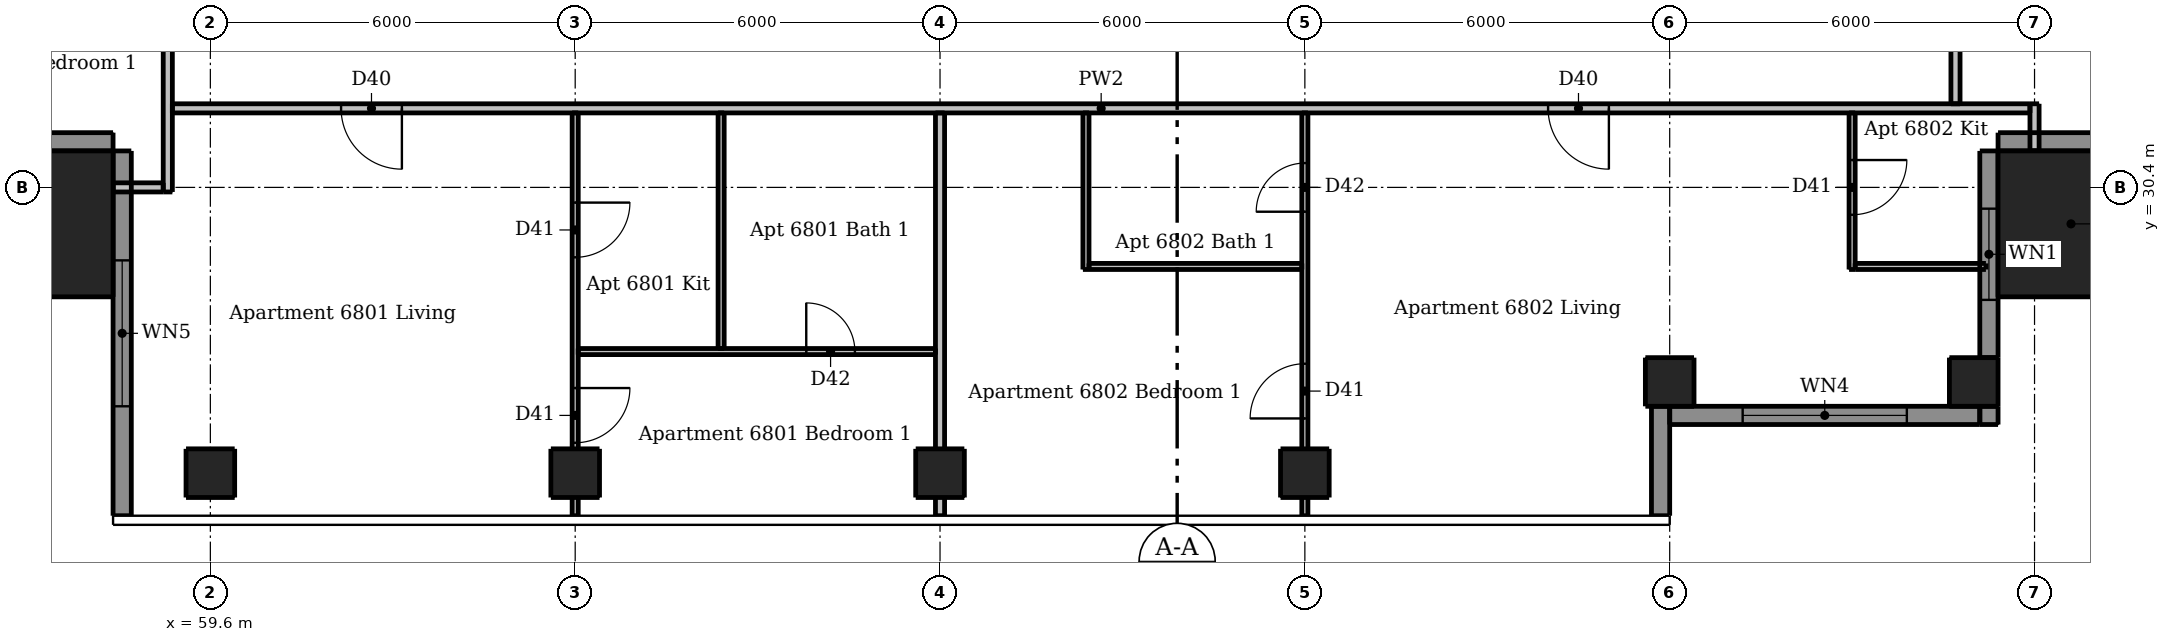
"""IFC4 building model, lengths in metres.
Left out: names, types, materials, properties, quantities, classifications, styles, units other than length and angle.
Written with IfcOpenShell. Run it as: python <this file> out.ifc"""

import sys

from ifc_helpers import new_model, si_unit, direction, frame, frame_2d, origin, origin_2d, place, context, subcontext, project, spatial, rectangle, extrude, element, fill, save


model = new_model("IFC4")
c1 = context("Model", 3, precision=1e-05, world=origin(), true_north=direction((0.0, 1.0)))
c2 = subcontext(c1, "Body", "Model", "MODEL_VIEW")
j1 = project(units=[si_unit("LENGTHUNIT", "METRE"), si_unit("PLANEANGLEUNIT", "RADIAN")], contexts=[c1])
p1 = place(None, origin())
s1 = spatial("IfcSite", under=j1, at=p1, CompositionType="ELEMENT")
p2 = place(p1, origin())
s2 = spatial("IfcBuilding", under=s1, at=p2, CompositionType="ELEMENT")
p3 = place(p2, frame((0.0, 0.0, 255.4)))
s3 = spatial("IfcBuildingStorey", under=s2, at=p3, CompositionType="ELEMENT", Elevation=255.4)
for number, where, z_axis, x_axis in (
    (1, (59.6, 25.7, 0.0), (0.0, 0.0, 1.0), (1.0, 0.0, 0.0)),
    (2, (65.6, 25.7, 0.0), (0.0, 0.0, 1.0), (1.0, 0.0, 0.0)),
    (3, (71.6, 25.7, 0.0), (0.0, 0.0, 1.0), (1.0, 0.0, 0.0)),
    (4, (77.6, 25.7, 0.0), (0.0, 0.0, 1.0), (1.0, 0.0, 0.0)),
    (5, (83.6, 27.2, 0.0), (0.0, 0.0, 1.0), (1.0, 0.0, 0.0)),
    (6, (88.6, 27.2, 0.0), (0.0, 0.0, 1.0), (1.0, 0.0, 0.0)),
):
    element("IfcColumn", number, at=place(p3, frame(where, z_axis=z_axis, x_axis=x_axis)), inside=s3, PredefinedType="COLUMN", context=c2, shape_type="SweptSolid", body=[
        extrude(rectangle(XDim=0.8, YDim=0.8, at=origin_2d()), origin(), (0.0, 0.0, 1.0), 3.05),
    ])
for number, where, z_axis, x_axis in (
    (7, (56.8, 29.8, 0.0), (0.0, 0.0, 1.0), (1.0, 0.0, 0.0)),
    (8, (90.2, 29.8, 0.0), (0.0, 0.0, 1.0), (1.0, 0.0, 0.0)),
):
    element("IfcColumn", number, at=place(p3, frame(where, z_axis=z_axis, x_axis=x_axis)), inside=s3, PredefinedType="COLUMN", context=c2, shape_type="SweptSolid", body=[
        extrude(rectangle(XDim=2.4, YDim=2.4, at=origin_2d()), origin(), (0.0, 0.0, 1.0), 3.3),
    ])
p4 = place(p3, frame((83.45, 25.0, 0.0), z_axis=(0.0, 0.0, 1.0), x_axis=(0.0, 1.0, 0.0)))
e9 = element("IfcWall", 9, at=p4, inside=s3, PredefinedType="SOLIDWALL", context=c2, shape_type="SweptSolid", body=[
    extrude(rectangle(XDim=1.8, YDim=0.3, at=frame_2d((0.9, 0.0))), origin(), (0.0, 0.0, 1.0), 3.05),
])
p5 = place(p3, frame((88.85, 26.5, 0.0), z_axis=(0.0, 0.0, 1.0), x_axis=(0.0, 1.0, 0.0)))
e10 = element("IfcWall", 10, at=p5, inside=s3, PredefinedType="SOLIDWALL", context=c2, shape_type="SweptSolid", body=[
    extrude(rectangle(XDim=0.3, YDim=0.3, at=frame_2d((0.15, 0.0))), origin(), (0.0, 0.0, 1.0), 3.05),
])
p6 = place(p3, frame((88.85, 27.6, 0.0), z_axis=(0.0, 0.0, 1.0), x_axis=(0.0, 1.0, 0.0)))
e11 = element("IfcWall", 11, at=p6, inside=s3, PredefinedType="SOLIDWALL", context=c2, shape_type="SweptSolid", body=[
    extrude(rectangle(XDim=3.4, YDim=0.3, at=frame_2d((1.7, 0.0))), origin(), (0.0, 0.0, 1.0), 3.05),
])
p7 = place(p6, frame((0.95, 0.0, 0.9)))
e12 = element("IfcOpeningElement", 12, at=p7, cuts=e11, PredefinedType="OPENING", context=c2, shape_type="SweptSolid", body=[
    extrude(rectangle(XDim=1.5, YDim=1.5, at=frame_2d((0.75, 0.75))), frame((0.0, 0.16, 0.0), z_axis=(0.0, -1.0, 0.0), x_axis=(1.0, 0.0, 0.0)), (0.0, 0.0, 1.0), 0.32),
])
p8 = place(p3, frame((89.0, 31.15, 0.0), z_axis=(0.0, 0.0, 1.0), x_axis=(1.0, 0.0, 0.0)))
e13 = element("IfcWall", 13, at=p8, inside=s3, PredefinedType="SOLIDWALL", context=c2, shape_type="SweptSolid", body=[
    extrude(rectangle(XDim=3.4, YDim=0.3, at=frame_2d((1.7, 0.0))), origin(), (0.0, 0.0, 1.0), 3.05),
])
p9 = place(p3, frame((53.0, 31.15, 0.0), z_axis=(0.0, 0.0, 1.0), x_axis=(1.0, 0.0, 0.0)))
e14 = element("IfcWall", 14, at=p9, inside=s3, PredefinedType="SOLIDWALL", context=c2, shape_type="SweptSolid", body=[
    extrude(rectangle(XDim=5.0, YDim=0.3, at=frame_2d((2.5, 0.0))), origin(), (0.0, 0.0, 1.0), 3.05),
])
p10 = place(p3, frame((58.15, 31.0, 0.0), z_axis=(0.0, 0.0, 1.0), x_axis=(0.0, -1.0, 0.0)))
e15 = element("IfcWall", 15, at=p10, inside=s3, PredefinedType="SOLIDWALL", context=c2, shape_type="SweptSolid", body=[
    extrude(rectangle(XDim=6.0, YDim=0.3, at=frame_2d((3.0, 0.0))), origin(), (0.0, 0.0, 1.0), 3.05),
])
p11 = place(p10, frame((1.8, 0.0, 0.15)))
e16 = element("IfcOpeningElement", 16, at=p11, cuts=e15, PredefinedType="OPENING", context=c2, shape_type="SweptSolid", body=[
    extrude(rectangle(XDim=2.4, YDim=2.1, at=frame_2d((1.2, 1.05))), frame((0.0, 0.16, 0.0), z_axis=(0.0, -1.0, 0.0), x_axis=(1.0, 0.0, 0.0)), (0.0, 0.0, 1.0), 0.32),
])
p12 = place(p3, frame((83.6, 26.65, 0.0), z_axis=(0.0, 0.0, 1.0), x_axis=(1.0, 0.0, 0.0)))
e17 = element("IfcWall", 17, at=p12, inside=s3, PredefinedType="SOLIDWALL", context=c2, shape_type="SweptSolid", body=[
    extrude(rectangle(XDim=5.1, YDim=0.3, at=frame_2d((2.55, 0.0))), origin(), (0.0, 0.0, 1.0), 3.05),
])
p13 = place(p12, frame((1.2, 0.0, 0.15)))
e18 = element("IfcOpeningElement", 18, at=p13, cuts=e17, PredefinedType="OPENING", context=c2, shape_type="SweptSolid", body=[
    extrude(rectangle(XDim=2.7, YDim=2.1, at=frame_2d((1.35, 1.05))), frame((0.0, 0.16, 0.0), z_axis=(0.0, -1.0, 0.0), x_axis=(1.0, 0.0, 0.0)), (0.0, 0.0, 1.0), 0.32),
])
p14 = place(p3, frame((65.6, 31.625, 0.0), z_axis=(0.0, 0.0, 1.0), x_axis=(0.0, -1.0, 0.0)))
e19 = element("IfcWall", 19, at=p14, inside=s3, PredefinedType="PARTITIONING", context=c2, shape_type="SweptSolid", body=[
    extrude(rectangle(XDim=6.625, YDim=0.1, at=frame_2d((3.312, 0.0))), origin(), (0.0, 0.0, 1.0), 2.59),
])
p15 = place(p14, frame((1.475, 0.0, 0.0)))
e20 = element("IfcOpeningElement", 20, at=p15, cuts=e19, PredefinedType="OPENING", context=c2, shape_type="SweptSolid", body=[
    extrude(rectangle(XDim=0.9, YDim=2.1, at=frame_2d((0.45, 1.05))), frame((0.0, 0.06, 0.0), z_axis=(0.0, -1.0, 0.0), x_axis=(1.0, 0.0, 0.0)), (0.0, 0.0, 1.0), 0.12),
])
p16 = place(p14, frame((4.525, 0.0, 0.0)))
e21 = element("IfcOpeningElement", 21, at=p16, cuts=e19, PredefinedType="OPENING", context=c2, shape_type="SweptSolid", body=[
    extrude(rectangle(XDim=0.9, YDim=2.1, at=frame_2d((0.45, 1.05))), frame((0.0, 0.06, 0.0), z_axis=(0.0, -1.0, 0.0), x_axis=(1.0, 0.0, 0.0)), (0.0, 0.0, 1.0), 0.12),
])
p17 = place(p3, frame((68.0, 27.75, 0.0), z_axis=(0.0, 0.0, 1.0), x_axis=(0.0, 1.0, 0.0)))
e22 = element("IfcWall", 22, at=p17, inside=s3, PredefinedType="PARTITIONING", context=c2, shape_type="SweptSolid", body=[
    extrude(rectangle(XDim=3.875, YDim=0.1, at=frame_2d((1.938, 0.0))), origin(), (0.0, 0.0, 1.0), 3.05),
])
p18 = place(p3, frame((74.0, 29.05, 0.0), z_axis=(0.0, 0.0, 1.0), x_axis=(0.0, 1.0, 0.0)))
e23 = element("IfcWall", 23, at=p18, inside=s3, PredefinedType="PARTITIONING", context=c2, shape_type="SweptSolid", body=[
    extrude(rectangle(XDim=2.575, YDim=0.1, at=frame_2d((1.288, 0.0))), origin(), (0.0, 0.0, 1.0), 3.05),
])
p19 = place(p3, frame((77.6, 25.0, 0.0), z_axis=(0.0, 0.0, 1.0), x_axis=(0.0, 1.0, 0.0)))
e24 = element("IfcWall", 24, at=p19, inside=s3, PredefinedType="PARTITIONING", context=c2, shape_type="SweptSolid", body=[
    extrude(rectangle(XDim=6.625, YDim=0.1, at=frame_2d((3.312, 0.0))), origin(), (0.0, 0.0, 1.0), 2.59),
])
p20 = place(p19, frame((1.6, 0.0, 0.0)))
e25 = element("IfcOpeningElement", 25, at=p20, cuts=e24, PredefinedType="OPENING", context=c2, shape_type="SweptSolid", body=[
    extrude(rectangle(XDim=0.9, YDim=2.1, at=frame_2d((0.45, 1.05))), frame((0.0, 0.06, 0.0), z_axis=(0.0, -1.0, 0.0), x_axis=(1.0, 0.0, 0.0)), (0.0, 0.0, 1.0), 0.12),
])
p21 = place(p19, frame((5.0, 0.0, 0.0)))
e26 = element("IfcOpeningElement", 26, at=p21, cuts=e24, PredefinedType="OPENING", context=c2, shape_type="SweptSolid", body=[
    extrude(rectangle(XDim=0.8, YDim=2.1, at=frame_2d((0.4, 1.05))), frame((0.0, 0.06, 0.0), z_axis=(0.0, -1.0, 0.0), x_axis=(1.0, 0.0, 0.0)), (0.0, 0.0, 1.0), 0.12),
])
p22 = place(p3, frame((86.6, 31.625, 0.0), z_axis=(0.0, 0.0, 1.0), x_axis=(0.0, -1.0, 0.0)))
e27 = element("IfcWall", 27, at=p22, inside=s3, PredefinedType="PARTITIONING", context=c2, shape_type="SweptSolid", body=[
    extrude(rectangle(XDim=2.575, YDim=0.1, at=frame_2d((1.288, 0.0))), origin(), (0.0, 0.0, 1.0), 3.05),
])
p23 = place(p22, frame((0.775, 0.0, 0.0)))
e28 = element("IfcOpeningElement", 28, at=p23, cuts=e27, PredefinedType="OPENING", context=c2, shape_type="SweptSolid", body=[
    extrude(rectangle(XDim=0.9, YDim=2.1, at=frame_2d((0.45, 1.05))), frame((0.0, 0.06, 0.0), z_axis=(0.0, -1.0, 0.0), x_axis=(1.0, 0.0, 0.0)), (0.0, 0.0, 1.0), 0.12),
])
p24 = place(p3, frame((74.05, 29.1, 0.0), z_axis=(0.0, 0.0, 1.0), x_axis=(1.0, 0.0, 0.0)))
e29 = element("IfcWall", 29, at=p24, inside=s3, PredefinedType="PARTITIONING", context=c2, shape_type="SweptSolid", body=[
    extrude(rectangle(XDim=3.5, YDim=0.1, at=frame_2d((1.75, 0.0))), origin(), (0.0, 0.0, 1.0), 3.05),
])
p25 = place(p3, frame((86.65, 29.1, 0.0), z_axis=(0.0, 0.0, 1.0), x_axis=(1.0, 0.0, 0.0)))
e30 = element("IfcWall", 30, at=p25, inside=s3, PredefinedType="PARTITIONING", context=c2, shape_type="SweptSolid", body=[
    extrude(rectangle(XDim=2.15, YDim=0.1, at=frame_2d((1.075, 0.0))), origin(), (0.0, 0.0, 1.0), 3.05),
])
p26 = place(p3, frame((65.65, 27.7, 0.0), z_axis=(0.0, 0.0, 1.0), x_axis=(1.0, 0.0, 0.0)))
e31 = element("IfcWall", 31, at=p26, inside=s3, PredefinedType="PARTITIONING", context=c2, shape_type="SweptSolid", body=[
    extrude(rectangle(XDim=5.875, YDim=0.1, at=frame_2d((2.938, 0.0))), origin(), (0.0, 0.0, 1.0), 3.05),
])
p27 = place(p26, frame((3.75, 0.0, 0.0)))
e32 = element("IfcOpeningElement", 32, at=p27, cuts=e31, PredefinedType="OPENING", context=c2, shape_type="SweptSolid", body=[
    extrude(rectangle(XDim=0.8, YDim=2.1, at=frame_2d((0.4, 1.05))), frame((0.0, 0.06, 0.0), z_axis=(0.0, -1.0, 0.0), x_axis=(1.0, 0.0, 0.0)), (0.0, 0.0, 1.0), 0.12),
])
p28 = place(p3, frame((58.9, 30.325, 0.0), z_axis=(0.0, 0.0, 1.0), x_axis=(0.0, 1.0, 0.0)))
e33 = element("IfcWall", 33, at=p28, inside=s3, PredefinedType="PARTITIONING", context=c2, shape_type="SweptSolid", body=[
    extrude(rectangle(XDim=30.85, YDim=0.15, at=frame_2d((15.425, 0.0))), origin(), (0.0, 0.0, 1.0), 3.05),
])
p29 = place(p28, frame((7.375, 0.0, 0.0)))
e34 = element("IfcOpeningElement", 34, at=p29, cuts=e33, PredefinedType="OPENING", context=c2, shape_type="SweptSolid", body=[
    extrude(rectangle(XDim=1.0, YDim=2.1, at=frame_2d((0.5, 1.05))), frame((0.0, 0.085, 0.0), z_axis=(0.0, -1.0, 0.0), x_axis=(1.0, 0.0, 0.0)), (0.0, 0.0, 1.0), 0.17),
])
p30 = place(p28, frame((26.925, 0.0, 0.0)))
e35 = element("IfcOpeningElement", 35, at=p30, cuts=e33, PredefinedType="OPENING", context=c2, shape_type="SweptSolid", body=[
    extrude(rectangle(XDim=1.0, YDim=2.1, at=frame_2d((0.5, 1.05))), frame((0.0, 0.085, 0.0), z_axis=(0.0, -1.0, 0.0), x_axis=(1.0, 0.0, 0.0)), (0.0, 0.0, 1.0), 0.17),
])
p31 = place(p3, frame((71.6, 25.0, 0.0), z_axis=(0.0, 0.0, 1.0), x_axis=(0.0, 1.0, 0.0)))
e36 = element("IfcWall", 36, at=p31, inside=s3, PredefinedType="PARTITIONING", context=c2, shape_type="SweptSolid", body=[
    extrude(rectangle(XDim=6.625, YDim=0.15, at=frame_2d((3.312, 0.0))), origin(), (0.0, 0.0, 1.0), 2.59),
])
p32 = place(p3, frame((88.3, 61.175, 0.0), z_axis=(0.0, 0.0, 1.0), x_axis=(0.0, -1.0, 0.0)))
e37 = element("IfcWall", 37, at=p32, inside=s3, PredefinedType="PARTITIONING", context=c2, shape_type="SweptSolid", body=[
    extrude(rectangle(XDim=29.4, YDim=0.15, at=frame_2d((14.7, 0.0))), origin(), (0.0, 0.0, 1.0), 3.05),
])
p33 = place(p32, frame((27.025, 0.0, 0.0)))
e38 = element("IfcOpeningElement", 38, at=p33, cuts=e37, PredefinedType="OPENING", context=c2, shape_type="SweptSolid", body=[
    extrude(rectangle(XDim=1.0, YDim=2.1, at=frame_2d((0.5, 1.05))), frame((0.0, 0.085, 0.0), z_axis=(0.0, -1.0, 0.0), x_axis=(1.0, 0.0, 0.0)), (0.0, 0.0, 1.0), 0.17),
])
p34 = place(p32, frame((9.275, 0.0, 0.0)))
e39 = element("IfcOpeningElement", 39, at=p34, cuts=e37, PredefinedType="OPENING", context=c2, shape_type="SweptSolid", body=[
    extrude(rectangle(XDim=1.0, YDim=2.1, at=frame_2d((0.5, 1.05))), frame((0.0, 0.085, 0.0), z_axis=(0.0, -1.0, 0.0), x_axis=(1.0, 0.0, 0.0)), (0.0, 0.0, 1.0), 0.17),
])
p35 = place(p3, frame((89.6, 31.0, 0.0), z_axis=(0.0, 0.0, 1.0), x_axis=(0.0, 1.0, 0.0)))
e40 = element("IfcWall", 40, at=p35, inside=s3, PredefinedType="PARTITIONING", context=c2, shape_type="SweptSolid", body=[
    extrude(rectangle(XDim=0.775, YDim=0.15, at=frame_2d((0.387, 0.0))), origin(), (0.0, 0.0, 1.0), 3.05),
])
p36 = place(p3, frame((89.525, 31.7, 0.0), z_axis=(0.0, 0.0, 1.0), x_axis=(-1.0, 0.0, 0.0)))
e41 = element("IfcWall", 41, at=p36, inside=s3, PredefinedType="PARTITIONING", context=c2, shape_type="SweptSolid", body=[
    extrude(rectangle(XDim=30.55, YDim=0.15, at=frame_2d((15.275, 0.0))), origin(), (0.0, 0.0, 1.0), 3.05),
])
p37 = place(p36, frame((26.775, 0.0, 0.0)))
e42 = element("IfcOpeningElement", 42, at=p37, cuts=e41, PredefinedType="OPENING", context=c2, shape_type="SweptSolid", body=[
    extrude(rectangle(XDim=1.0, YDim=2.1, at=frame_2d((0.5, 1.05))), frame((0.0, 0.085, 0.0), z_axis=(0.0, -1.0, 0.0), x_axis=(1.0, 0.0, 0.0)), (0.0, 0.0, 1.0), 0.17),
])
p38 = place(p36, frame((6.925, 0.0, 0.0)))
e43 = element("IfcOpeningElement", 43, at=p38, cuts=e41, PredefinedType="OPENING", context=c2, shape_type="SweptSolid", body=[
    extrude(rectangle(XDim=1.0, YDim=2.1, at=frame_2d((0.5, 1.05))), frame((0.0, 0.085, 0.0), z_axis=(0.0, -1.0, 0.0), x_axis=(1.0, 0.0, 0.0)), (0.0, 0.0, 1.0), 0.17),
])
p39 = place(p3, frame((58.0, 30.4, 0.0), z_axis=(0.0, 0.0, 1.0), x_axis=(1.0, 0.0, 0.0)))
e44 = element("IfcWall", 44, at=p39, inside=s3, PredefinedType="PARTITIONING", context=c2, shape_type="SweptSolid", body=[
    extrude(rectangle(XDim=0.825, YDim=0.15, at=frame_2d((0.413, 0.0))), origin(), (0.0, 0.0, 1.0), 3.05),
])
p40 = place(p7, origin())
e45 = element("IfcWindow", 45, at=p40, inside=s3, PartitioningType="DOUBLE_PANEL_VERTICAL", PredefinedType="WINDOW", context=c2, shape_type="SweptSolid", body=[
    extrude(rectangle(XDim=1.5, YDim=1.5, at=frame_2d((0.75, 0.75))), frame((0.0, 0.03, 0.0), z_axis=(0.0, -1.0, 0.0), x_axis=(1.0, 0.0, 0.0)), (0.0, 0.0, 1.0), 0.06),
])
fill(e12, e45)
p41 = place(p11, origin())
e46 = element("IfcWindow", 46, at=p41, inside=s3, PartitioningType="DOUBLE_PANEL_VERTICAL", PredefinedType="WINDOW", context=c2, shape_type="SweptSolid", body=[
    extrude(rectangle(XDim=2.4, YDim=2.1, at=frame_2d((1.2, 1.05))), frame((0.0, 0.03, 0.0), z_axis=(0.0, -1.0, 0.0), x_axis=(1.0, 0.0, 0.0)), (0.0, 0.0, 1.0), 0.06),
])
fill(e16, e46)
p42 = place(p13, origin())
e47 = element("IfcWindow", 47, at=p42, inside=s3, PartitioningType="DOUBLE_PANEL_VERTICAL", PredefinedType="WINDOW", context=c2, shape_type="SweptSolid", body=[
    extrude(rectangle(XDim=2.7, YDim=2.1, at=frame_2d((1.35, 1.05))), frame((0.0, 0.03, 0.0), z_axis=(0.0, -1.0, 0.0), x_axis=(1.0, 0.0, 0.0)), (0.0, 0.0, 1.0), 0.06),
])
fill(e18, e47)
p43 = place(p37, origin())
e48 = element("IfcDoor", 48, at=p43, inside=s3, OperationType="SINGLE_SWING_LEFT", PredefinedType="DOOR", context=c2, shape_type="SweptSolid", body=[
    extrude(rectangle(XDim=1.0, YDim=2.1, at=frame_2d((0.5, 1.05))), frame((0.0, 0.025, 0.0), z_axis=(0.0, -1.0, 0.0), x_axis=(1.0, 0.0, 0.0)), (0.0, 0.0, 1.0), 0.05),
])
fill(e42, e48)
p44 = place(p15, origin())
e49 = element("IfcDoor", 49, at=p44, inside=s3, OperationType="SINGLE_SWING_LEFT", PredefinedType="DOOR", context=c2, shape_type="SweptSolid", body=[
    extrude(rectangle(XDim=0.9, YDim=2.1, at=frame_2d((0.45, 1.05))), frame((0.0, 0.025, 0.0), z_axis=(0.0, -1.0, 0.0), x_axis=(1.0, 0.0, 0.0)), (0.0, 0.0, 1.0), 0.05),
])
fill(e20, e49)
p45 = place(p16, origin())
e50 = element("IfcDoor", 50, at=p45, inside=s3, OperationType="SINGLE_SWING_LEFT", PredefinedType="DOOR", context=c2, shape_type="SweptSolid", body=[
    extrude(rectangle(XDim=0.9, YDim=2.1, at=frame_2d((0.45, 1.05))), frame((0.0, 0.025, 0.0), z_axis=(0.0, -1.0, 0.0), x_axis=(1.0, 0.0, 0.0)), (0.0, 0.0, 1.0), 0.05),
])
fill(e21, e50)
p46 = place(p27, origin())
e51 = element("IfcDoor", 51, at=p46, inside=s3, OperationType="SINGLE_SWING_LEFT", PredefinedType="DOOR", context=c2, shape_type="SweptSolid", body=[
    extrude(rectangle(XDim=0.8, YDim=2.1, at=frame_2d((0.4, 1.05))), frame((0.0, 0.025, 0.0), z_axis=(0.0, -1.0, 0.0), x_axis=(1.0, 0.0, 0.0)), (0.0, 0.0, 1.0), 0.05),
])
fill(e32, e51)
p47 = place(p38, origin())
e52 = element("IfcDoor", 52, at=p47, inside=s3, OperationType="SINGLE_SWING_LEFT", PredefinedType="DOOR", context=c2, shape_type="SweptSolid", body=[
    extrude(rectangle(XDim=1.0, YDim=2.1, at=frame_2d((0.5, 1.05))), frame((0.0, 0.025, 0.0), z_axis=(0.0, -1.0, 0.0), x_axis=(1.0, 0.0, 0.0)), (0.0, 0.0, 1.0), 0.05),
])
fill(e43, e52)
p48 = place(p23, origin())
e53 = element("IfcDoor", 53, at=p48, inside=s3, OperationType="SINGLE_SWING_LEFT", PredefinedType="DOOR", context=c2, shape_type="SweptSolid", body=[
    extrude(rectangle(XDim=0.9, YDim=2.1, at=frame_2d((0.45, 1.05))), frame((0.0, 0.025, 0.0), z_axis=(0.0, -1.0, 0.0), x_axis=(1.0, 0.0, 0.0)), (0.0, 0.0, 1.0), 0.05),
])
fill(e28, e53)
p49 = place(p20, origin())
e54 = element("IfcDoor", 54, at=p49, inside=s3, OperationType="SINGLE_SWING_LEFT", PredefinedType="DOOR", context=c2, shape_type="SweptSolid", body=[
    extrude(rectangle(XDim=0.9, YDim=2.1, at=frame_2d((0.45, 1.05))), frame((0.0, 0.025, 0.0), z_axis=(0.0, -1.0, 0.0), x_axis=(1.0, 0.0, 0.0)), (0.0, 0.0, 1.0), 0.05),
])
fill(e25, e54)
p50 = place(p21, origin())
e55 = element("IfcDoor", 55, at=p50, inside=s3, OperationType="SINGLE_SWING_LEFT", PredefinedType="DOOR", context=c2, shape_type="SweptSolid", body=[
    extrude(rectangle(XDim=0.8, YDim=2.1, at=frame_2d((0.4, 1.05))), frame((0.0, 0.025, 0.0), z_axis=(0.0, -1.0, 0.0), x_axis=(1.0, 0.0, 0.0)), (0.0, 0.0, 1.0), 0.05),
])
fill(e26, e55)
save(model, sys.argv[1])
